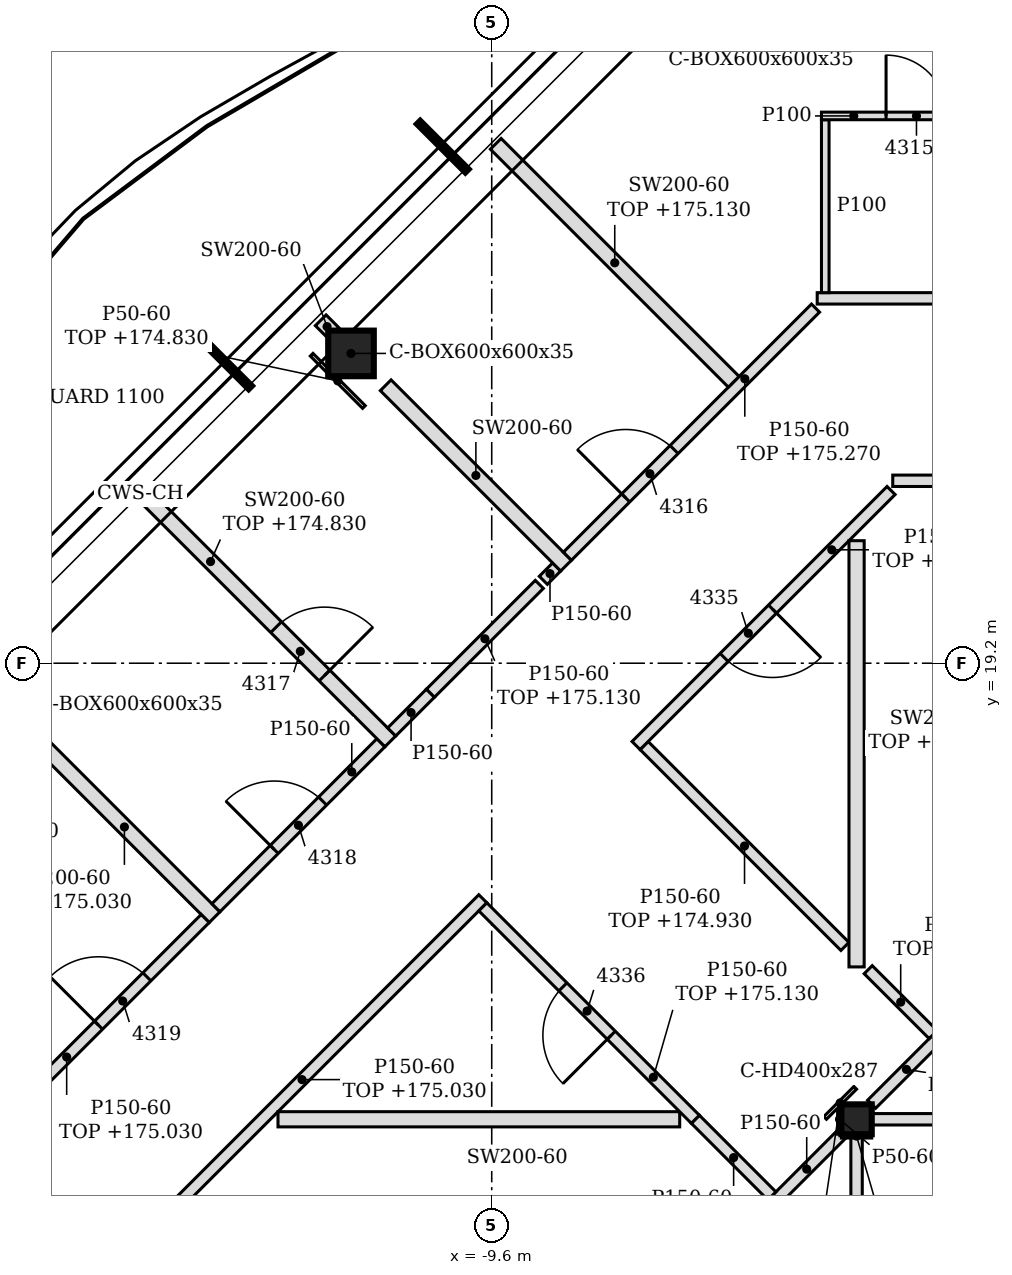
"""IFC4 building model, lengths in metres.
Left out: names, types, materials, properties, quantities, classifications, styles, units other than length and angle.
Written with IfcOpenShell. Run it as: python <this file> out.ifc"""

import sys

from ifc_helpers import new_model, si_unit, direction, frame, frame_2d, origin, origin_2d, place, context, subcontext, project, spatial, polyline, rectangle, hollow_rectangle, i_section, outline, extrude, clip, halfspace, element, fill, save


model = new_model("IFC4")
c1 = context("Model", 3, precision=1e-05, world=origin(), true_north=direction((0.0, 1.0)))
c2 = subcontext(c1, "Body", "Model", "MODEL_VIEW")
j1 = project(units=[si_unit("LENGTHUNIT", "METRE"), si_unit("PLANEANGLEUNIT", "RADIAN")], contexts=[c1])
p1 = place(None, origin())
s1 = spatial("IfcSite", under=j1, at=p1, CompositionType="ELEMENT")
p2 = place(p1, origin())
s2 = spatial("IfcBuilding", under=s1, at=p2, CompositionType="ELEMENT")
p3 = place(p2, frame((0.0, 0.0, 172.2)))
s3 = spatial("IfcBuildingStorey", under=s2, at=p3, CompositionType="ELEMENT", Elevation=172.2)
p4 = place(p3, frame((-11.451, 23.276, -0.15), z_axis=(0.062286590776, -0.041524393851, 0.99719411617), x_axis=(0.554700196225, 0.832050294338, 0.0)))
e1 = element("IfcColumn", 1, at=p4, inside=s3, PredefinedType="COLUMN", context=c2, shape_type="Clipping", body=[
    clip(clip(extrude(hollow_rectangle(XDim=0.6, YDim=0.6, WallThickness=0.035, at=origin_2d()), origin(), (0.0, 0.0, 1.0), 3.61), halfspace(frame((0.0, 0.0, 0.011), z_axis=(0.0, 0.0, 1.0), x_axis=(1.0, 0.0, 0.0)), True)), halfspace(frame((0.0, 0.0, 3.588), z_axis=(0.0, 0.0, 1.0), x_axis=(1.0, 0.0, 0.0)), False)),
])
p5 = place(p3, frame((-4.8, 13.2, -0.15), z_axis=(0.0, 0.0, 1.0), x_axis=(1.0, 0.0, 0.0)))
e2 = element("IfcColumn", 2, at=p5, inside=s3, PredefinedType="COLUMN", context=c2, shape_type="SweptSolid", body=[
    extrude(i_section(OverallWidth=0.399, OverallDepth=0.393, WebThickness=0.023, FlangeThickness=0.037, FilletRadius=0.015, at=origin_2d()), origin(), (0.0, 0.0, 1.0), 3.6),
])
p6 = place(p3, frame((-4.8, 2.596, 0.0), z_axis=(0.0, 0.0, 1.0), x_axis=(0.0, 1.0, 0.0)))
e3 = element("IfcWall", 3, at=p6, inside=s3, PredefinedType="PARTITIONING", context=c2, shape_type="SweptSolid", body=[
    extrude(rectangle(XDim=10.407, YDim=0.15, at=frame_2d((5.204, 0.0))), origin(), (0.0, 0.0, 1.0), 2.83),
])
p7 = place(p6, frame((4.303, 0.0, 0.0)))
e4 = element("IfcOpeningElement", 4, at=p7, cuts=e3, PredefinedType="OPENING", context=c2, shape_type="SweptSolid", body=[
    extrude(rectangle(XDim=0.9, YDim=2.1, at=frame_2d((0.45, 1.05))), frame((0.0, 0.085, 0.0), z_axis=(0.0, -1.0, 0.0), x_axis=(1.0, 0.0, 0.0)), (0.0, 0.0, 1.0), 0.17),
])
p8 = place(p3, frame((-14.475, 11.343, 0.0), z_axis=(0.0, 0.0, 1.0), x_axis=(0.707124921665, 0.707088640243, 0.0)))
e5 = element("IfcWall", 5, at=p8, inside=s3, PredefinedType="PARTITIONING", context=c2, shape_type="SweptSolid", body=[
    extrude(rectangle(XDim=6.729, YDim=0.15, at=frame_2d((3.365, 0.0))), origin(), (0.0, 0.0, 1.0), 2.83),
])
p9 = place(p3, frame((-5.914, 12.086, 0.0), z_axis=(0.0, 0.0, 1.0), x_axis=(0.707106781187, 0.707106781187, 0.0)))
e6 = element("IfcWall", 6, at=p9, inside=s3, PredefinedType="PARTITIONING", context=c2, shape_type="SweptSolid", body=[
    extrude(rectangle(XDim=1.295, YDim=0.15, at=frame_2d((0.648, 0.0))), origin(), (0.0, 0.0, 1.0), 3.45),
])
p10 = place(p3, frame((-5.914, 12.192, 0.0), z_axis=(0.0, 0.0, 1.0), x_axis=(-0.706763941595, 0.707449454633, 0.0)))
e7 = element("IfcWall", 7, at=p10, inside=s3, PredefinedType="PARTITIONING", context=c2, shape_type="SweptSolid", body=[
    extrude(rectangle(XDim=1.425, YDim=0.15, at=frame_2d((0.712, 0.0))), origin(), (0.0, 0.0, 1.0), 3.45),
])
p11 = place(p3, frame((-12.412, 13.2, 0.0), z_axis=(0.0, 0.0, 1.0), x_axis=(1.0, 0.0, 0.0)))
e8 = element("IfcWall", 8, at=p11, inside=s3, PredefinedType="PARTITIONING", context=c2, shape_type="SweptSolid", body=[
    extrude(rectangle(XDim=5.285, YDim=0.2, at=frame_2d((2.643, 0.0))), origin(), (0.0, 0.0, 1.0), 3.45),
])
p12 = place(p3, frame((-6.921, 13.2, 0.0), z_axis=(0.0, 0.0, 1.0), x_axis=(-0.707230271715, 0.706983269088, 0.0)))
e9 = element("IfcWall", 9, at=p12, inside=s3, PredefinedType="PARTITIONING", context=c2, shape_type="SweptSolid", body=[
    extrude(rectangle(XDim=3.954, YDim=0.15, at=frame_2d((1.977, 0.0))), origin(), (0.0, 0.0, 1.0), 2.93),
])
p13 = place(p12, frame((1.564, 0.0, 0.0)))
e10 = element("IfcOpeningElement", 10, at=p13, cuts=e9, PredefinedType="OPENING", context=c2, shape_type="SweptSolid", body=[
    extrude(rectangle(XDim=0.9, YDim=2.1, at=frame_2d((0.45, 1.05))), frame((0.0, 0.085, 0.0), z_axis=(0.0, -1.0, 0.0), x_axis=(1.0, 0.0, 0.0)), (0.0, 0.0, 1.0), 0.17),
])
p14 = place(p3, frame((-4.601, 13.2, 0.0), z_axis=(0.0, 0.0, 1.0), x_axis=(1.0, 0.0, 0.0)))
e11 = element("IfcWall", 11, at=p14, inside=s3, PredefinedType="PARTITIONING", context=c2, shape_type="SweptSolid", body=[
    extrude(rectangle(XDim=9.476, YDim=0.15, at=frame_2d((4.738, 0.0))), origin(), (0.0, 0.0, 1.0), 2.83),
])
p15 = place(p14, frame((4.151, 0.0, 0.0)))
e12 = element("IfcOpeningElement", 12, at=p15, cuts=e11, PredefinedType="OPENING", context=c2, shape_type="SweptSolid", body=[
    extrude(rectangle(XDim=0.9, YDim=2.1, at=frame_2d((0.45, 1.05))), frame((0.0, 0.085, 0.0), z_axis=(0.0, -1.0, 0.0), x_axis=(1.0, 0.0, 0.0)), (0.0, 0.0, 1.0), 0.17),
])
p16 = place(p3, frame((-4.602, 13.398, 0.0), z_axis=(0.0, 0.0, 1.0), x_axis=(0.707106781187, 0.707106781187, 0.0)))
e13 = element("IfcWall", 13, at=p16, inside=s3, PredefinedType="PARTITIONING", context=c2, shape_type="SweptSolid", body=[
    extrude(rectangle(XDim=1.296, YDim=0.15, at=frame_2d((0.648, 0.0))), origin(), (0.0, 0.0, 1.0), 3.45),
])
p17 = place(p3, frame((-15.611, 13.6, 0.0), z_axis=(0.0, 0.0, 1.0), x_axis=(0.707145291481, 0.707068268794, 0.0)))
e14 = element("IfcWall", 14, at=p17, inside=s3, PredefinedType="PARTITIONING", context=c2, shape_type="SweptSolid", body=[
    extrude(rectangle(XDim=3.17, YDim=0.15, at=frame_2d((1.585, 0.0))), origin(), (0.0, 0.0, 1.0), 2.83),
])
p18 = place(p17, frame((1.185, 0.0, 0.0)))
e15 = element("IfcOpeningElement", 15, at=p18, cuts=e14, PredefinedType="OPENING", context=c2, shape_type="SweptSolid", body=[
    extrude(rectangle(XDim=0.9, YDim=2.1, at=frame_2d((0.45, 1.05))), frame((0.0, 0.085, 0.0), z_axis=(0.0, -1.0, 0.0), x_axis=(1.0, 0.0, 0.0)), (0.0, 0.0, 1.0), 0.17),
])
p19 = place(p3, frame((-3.792, 14.314, 0.0), z_axis=(0.0, 0.0, 1.0), x_axis=(-0.707409718716, 0.706803713817, 0.0)))
e16 = element("IfcWall", 16, at=p19, inside=s3, PredefinedType="PARTITIONING", context=c2, shape_type="SweptSolid", body=[
    extrude(rectangle(XDim=1.208, YDim=0.15, at=frame_2d((0.604, 0.0))), origin(), (0.0, 0.0, 1.0), 2.73),
])
p20 = place(p3, frame((-4.8, 15.205, 0.0), z_axis=(0.0, 0.0, 1.0), x_axis=(0.0, 1.0, 0.0)))
e17 = element("IfcWall", 17, at=p20, inside=s3, PredefinedType="PARTITIONING", context=c2, shape_type="SweptSolid", body=[
    extrude(rectangle(XDim=5.607, YDim=0.2, at=frame_2d((2.804, 0.0))), origin(), (0.0, 0.0, 1.0), 2.73),
])
p21 = place(p3, frame((-4.953, 15.474, 0.0), z_axis=(0.0, 0.0, 1.0), x_axis=(-0.707008778354, 0.707204770438, 0.0)))
e18 = element("IfcWall", 18, at=p21, inside=s3, PredefinedType="PARTITIONING", context=c2, shape_type="SweptSolid", body=[
    extrude(rectangle(XDim=3.737, YDim=0.15, at=frame_2d((1.869, 0.0))), origin(), (0.0, 0.0, 1.0), 2.73),
])
p22 = place(p3, frame((-13.246, 15.859, 0.0), z_axis=(0.0, 0.0, 1.0), x_axis=(-0.706961285969, 0.707252246473, 0.0)))
e19 = element("IfcWall", 19, at=p22, inside=s3, PredefinedType="PARTITIONING", context=c2, shape_type="SweptSolid", body=[
    extrude(rectangle(XDim=3.356, YDim=0.2, at=frame_2d((1.678, 0.0))), origin(), (0.0, 0.0, 1.0), 2.83),
])
p23 = place(p3, frame((-13.228, 15.983, 0.0), z_axis=(0.0, 0.0, 1.0), x_axis=(0.706947737832, 0.707265788777, 0.0)))
e20 = element("IfcWall", 20, at=p23, inside=s3, PredefinedType="PARTITIONING", context=c2, shape_type="SweptSolid", body=[
    extrude(rectangle(XDim=3.071, YDim=0.15, at=frame_2d((1.535, 0.0))), origin(), (0.0, 0.0, 1.0), 3.45),
])
p24 = place(p23, frame((1.085, 0.0, 0.0)))
e21 = element("IfcOpeningElement", 21, at=p24, cuts=e20, PredefinedType="OPENING", context=c2, shape_type="SweptSolid", body=[
    extrude(rectangle(XDim=0.9, YDim=2.1, at=frame_2d((0.45, 1.05))), frame((0.0, 0.085, 0.0), z_axis=(0.0, -1.0, 0.0), x_axis=(1.0, 0.0, 0.0)), (0.0, 0.0, 1.0), 0.17),
])
p25 = place(p3, frame((-7.701, 18.117, 0.0), z_axis=(0.0, 0.0, 1.0), x_axis=(0.707106781187, 0.707106781187, 0.0)))
e22 = element("IfcWall", 22, at=p25, inside=s3, PredefinedType="PARTITIONING", context=c2, shape_type="SweptSolid", body=[
    extrude(rectangle(XDim=4.745, YDim=0.15, at=frame_2d((2.372, 0.0))), origin(), (0.0, 0.0, 1.0), 2.73),
])
p26 = place(p25, frame((1.639, 0.0, 0.0)))
e23 = element("IfcOpeningElement", 23, at=p26, cuts=e22, PredefinedType="OPENING", context=c2, shape_type="SweptSolid", body=[
    extrude(rectangle(XDim=0.9, YDim=2.1, at=frame_2d((0.45, 1.05))), frame((0.0, 0.085, 0.0), z_axis=(0.0, -1.0, 0.0), x_axis=(1.0, 0.0, 0.0)), (0.0, 0.0, 1.0), 0.17),
])
p27 = place(p3, frame((-10.934, 18.172, 0.0), z_axis=(0.0, 0.0, 1.0), x_axis=(-0.707106781187, 0.707106781187, 0.0)))
e24 = element("IfcWall", 24, at=p27, inside=s3, PredefinedType="PARTITIONING", context=c2, shape_type="SweptSolid", body=[
    extrude(rectangle(XDim=4.565, YDim=0.2, at=frame_2d((2.282, 0.0))), origin(), (0.0, 0.0, 1.0), 2.63),
])
p28 = place(p27, frame((1.225, 0.0, 0.0)))
e25 = element("IfcOpeningElement", 25, at=p28, cuts=e24, PredefinedType="OPENING", context=c2, shape_type="SweptSolid", body=[
    extrude(rectangle(XDim=0.9, YDim=2.1, at=frame_2d((0.45, 1.05))), frame((0.0, 0.11, 0.0), z_axis=(0.0, -1.0, 0.0), x_axis=(1.0, 0.0, 0.0)), (0.0, 0.0, 1.0), 0.22),
])
p29 = place(p3, frame((-10.916, 18.296, 0.0), z_axis=(0.0, 0.0, 1.0), x_axis=(0.707106781187, 0.707106781187, 0.0)))
e26 = element("IfcWall", 26, at=p29, inside=s3, PredefinedType="PARTITIONING", context=c2, shape_type="SweptSolid", body=[
    extrude(rectangle(XDim=0.722, YDim=0.15, at=frame_2d((0.361, 0.0))), origin(), (0.0, 0.0, 1.0), 3.45),
])
p30 = place(p3, frame((-10.406, 18.806, 0.0), z_axis=(0.0, 0.0, 1.0), x_axis=(0.707408152147, 0.706805281726, 0.0)))
e27 = element("IfcWall", 27, at=p30, inside=s3, PredefinedType="PARTITIONING", context=c2, shape_type="SweptSolid", body=[
    extrude(rectangle(XDim=2.025, YDim=0.15, at=frame_2d((1.012, 0.0))), origin(), (0.0, 0.0, 1.0), 2.93),
])
p31 = place(p3, frame((-8.921, 20.291, 0.0), z_axis=(0.0, 0.0, 1.0), x_axis=(0.706615222949, 0.707597997946, 0.0)))
e28 = element("IfcWall", 28, at=p31, inside=s3, PredefinedType="PARTITIONING", context=c2, shape_type="SweptSolid", body=[
    extrude(rectangle(XDim=0.249, YDim=0.15, at=frame_2d((0.124, 0.0))), origin(), (0.0, 0.0, 1.0), 3.45),
])
p32 = place(p3, frame((-8.622, 20.484, 0.0), z_axis=(0.0, 0.0, 1.0), x_axis=(-0.707070404574, 0.707143155928, 0.0)))
e29 = element("IfcWall", 29, at=p32, inside=s3, PredefinedType="PARTITIONING", context=c2, shape_type="SweptSolid", body=[
    extrude(rectangle(XDim=3.356, YDim=0.2, at=frame_2d((1.678, 0.0))), origin(), (0.0, 0.0, 1.0), 3.45),
])
p33 = place(p3, frame((-8.604, 20.608, 0.0), z_axis=(0.0, 0.0, 1.0), x_axis=(0.707080337897, 0.707133223487, 0.0)))
e30 = element("IfcWall", 30, at=p33, inside=s3, PredefinedType="PARTITIONING", context=c2, shape_type="SweptSolid", body=[
    extrude(rectangle(XDim=4.616, YDim=0.15, at=frame_2d((2.308, 0.0))), origin(), (0.0, 0.0, 1.0), 3.07),
])
p34 = place(p33, frame((1.085, 0.0, 0.0)))
e31 = element("IfcOpeningElement", 31, at=p34, cuts=e30, PredefinedType="OPENING", context=c2, shape_type="SweptSolid", body=[
    extrude(rectangle(XDim=0.9, YDim=2.1, at=frame_2d((0.45, 1.05))), frame((0.0, 0.085, 0.0), z_axis=(0.0, -1.0, 0.0), x_axis=(1.0, 0.0, 0.0)), (0.0, 0.0, 1.0), 0.17),
])
p35 = place(p3, frame((-4.324, 21.6, 0.0), z_axis=(0.0, 0.0, 1.0), x_axis=(1.0, 0.0, 0.0)))
e32 = element("IfcWall", 32, at=p35, inside=s3, PredefinedType="PARTITIONING", context=c2, shape_type="SweptSolid", body=[
    extrude(rectangle(XDim=9.199, YDim=0.15, at=frame_2d((4.6, 0.0))), origin(), (0.0, 0.0, 1.0), 3.45),
])
p36 = place(p3, frame((-6.416, 22.902, 0.0), z_axis=(0.0, 0.0, 1.0), x_axis=(-0.70713434924, 0.707079212059, 0.0)))
e33 = element("IfcWall", 33, at=p36, inside=s3, PredefinedType="PARTITIONING", context=c2, shape_type="SweptSolid", body=[
    extrude(rectangle(XDim=4.428, YDim=0.2, at=frame_2d((2.214, 0.0))), origin(), (0.0, 0.0, 1.0), 2.93),
])
p37 = place(p3, frame((-11.683, 23.545, 0.0), z_axis=(0.0, 0.0, 1.0), x_axis=(-0.707106781187, 0.707106781187, 0.0)))
e34 = element("IfcWall", 34, at=p37, inside=s3, PredefinedType="PARTITIONING", context=c2, shape_type="SweptSolid", body=[
    extrude(rectangle(XDim=0.236, YDim=0.2, at=frame_2d((0.118, 0.0))), origin(), (0.0, 0.0, 1.0), 3.45),
])
p38 = place(p3, frame((-5.318, 24.0, 0.0), z_axis=(0.0, 0.0, 1.0), x_axis=(1.0, 0.0, 0.0)))
e35 = element("IfcWall", 35, at=p38, inside=s3, PredefinedType="PARTITIONING", context=c2, shape_type="SweptSolid", body=[
    extrude(outline(polyline([(0.0, 0.0), (25.036, 0.0), (25.036, 3.45), (24.668, 3.45), (24.666, 2.73), (24.368, 2.73), (24.366, 2.88), (12.668, 2.88), (12.666, 2.73), (12.368, 2.73), (12.366, 2.88), (0.668, 2.88), (0.666, 2.73), (0.368, 2.73), (0.366, 3.45), (0.0, 3.45), (0.0, 0.0)])), frame((0.0, 0.075, 0.0), z_axis=(0.0, -1.0, 0.0), x_axis=(1.0, 0.0, 0.0)), (0.0, 0.0, 1.0), 0.15),
])
p39 = place(p38, frame((21.868, 0.0, 0.0)))
e36 = element("IfcOpeningElement", 36, at=p39, cuts=e35, PredefinedType="OPENING", context=c2, shape_type="SweptSolid", body=[
    extrude(rectangle(XDim=0.9, YDim=2.1, at=frame_2d((0.45, 1.05))), frame((0.0, 0.085, 0.0), z_axis=(0.0, -1.0, 0.0), x_axis=(1.0, 0.0, 0.0)), (0.0, 0.0, 1.0), 0.17),
])
p40 = place(p38, frame((12.181, 0.0, 0.0)))
e37 = element("IfcOpeningElement", 37, at=p40, cuts=e35, PredefinedType="OPENING", context=c2, shape_type="SweptSolid", body=[
    extrude(rectangle(XDim=0.9, YDim=2.1, at=frame_2d((0.45, 1.05))), frame((0.0, 0.085, 0.0), z_axis=(0.0, -1.0, 0.0), x_axis=(1.0, 0.0, 0.0)), (0.0, 0.0, 1.0), 0.17),
])
p41 = place(p38, frame((4.78, 0.0, 0.0)))
e38 = element("IfcOpeningElement", 38, at=p41, cuts=e35, PredefinedType="OPENING", context=c2, shape_type="SweptSolid", body=[
    extrude(rectangle(XDim=0.9, YDim=2.1, at=frame_2d((0.45, 1.05))), frame((0.0, 0.085, 0.0), z_axis=(0.0, -1.0, 0.0), x_axis=(1.0, 0.0, 0.0)), (0.0, 0.0, 1.0), 0.17),
])
p42 = place(p3, frame((-5.212, 24.075, 0.0), z_axis=(0.0, 0.0, 1.0), x_axis=(0.0, 1.0, 0.0)))
e39 = element("IfcWall", 39, at=p42, inside=s3, PredefinedType="PARTITIONING", context=c2, shape_type="SweptSolid", body=[
    extrude(rectangle(XDim=2.275, YDim=0.1, at=frame_2d((1.138, 0.0))), origin(), (0.0, 0.0, 1.0), 3.45),
])
p43 = place(p3, frame((-5.262, 26.4, 0.0), z_axis=(0.0, 0.0, 1.0), x_axis=(1.0, 0.0, 0.0)))
e40 = element("IfcWall", 40, at=p43, inside=s3, PredefinedType="PARTITIONING", context=c2, shape_type="SweptSolid", body=[
    extrude(outline(polyline([(0.0, 0.0), (2.5, 0.0), (2.5, 3.45), (0.612, 3.45), (0.61, 2.73), (0.312, 2.73), (0.31, 3.45), (0.0, 3.45), (0.0, 0.0)])), frame((0.0, 0.05, 0.0), z_axis=(0.0, -1.0, 0.0), x_axis=(1.0, 0.0, 0.0)), (0.0, 0.0, 1.0), 0.1),
])
p44 = place(p43, frame((0.85, 0.0, 0.0)))
e41 = element("IfcOpeningElement", 41, at=p44, cuts=e40, PredefinedType="OPENING", context=c2, shape_type="SweptSolid", body=[
    extrude(rectangle(XDim=0.8, YDim=2.1, at=frame_2d((0.4, 1.05))), frame((0.0, 0.06, 0.0), z_axis=(0.0, -1.0, 0.0), x_axis=(1.0, 0.0, 0.0)), (0.0, 0.0, 1.0), 0.12),
])
p45 = place(p3, frame((-5.024, 13.003, 0.0), z_axis=(0.0, 0.0, 1.0), x_axis=(0.0, 1.0, 0.0)))
e42 = element("IfcWall", 42, at=p45, inside=s3, PredefinedType="PARTITIONING", context=c2, shape_type="SweptSolid", body=[
    extrude(rectangle(XDim=0.393, YDim=0.05, at=frame_2d((0.197, 0.0))), origin(), (0.0, 0.0, 1.0), 3.45),
])
p46 = place(p3, frame((-5.214, 13.218, 0.0), z_axis=(0.0, 0.0, 1.0), x_axis=(0.707106781187, 0.707106781187, 0.0)))
e43 = element("IfcWall", 43, at=p46, inside=s3, PredefinedType="PARTITIONING", context=c2, shape_type="SweptSolid", body=[
    extrude(rectangle(XDim=0.56, YDim=0.05, at=frame_2d((0.28, 0.0))), origin(), (0.0, 0.0, 1.0), 2.73),
])
p47 = place(p3, frame((-5.0, 12.979, 0.0), z_axis=(0.0, 0.0, 1.0), x_axis=(1.0, 0.0, 0.0)))
e44 = element("IfcWall", 44, at=p47, inside=s3, PredefinedType="PARTITIONING", context=c2, shape_type="SweptSolid", body=[
    extrude(rectangle(XDim=0.399, YDim=0.05, at=frame_2d((0.199, 0.0))), origin(), (0.0, 0.0, 1.0), 2.83),
])
p48 = place(p3, frame((-11.281, 22.571, 0.0), z_axis=(0.0, 0.0, 1.0), x_axis=(-0.706981285266, 0.707232254838, 0.0)))
e45 = element("IfcWall", 45, at=p48, inside=s3, PredefinedType="PARTITIONING", context=c2, shape_type="SweptSolid", body=[
    extrude(rectangle(XDim=0.973, YDim=0.05, at=frame_2d((0.486, 0.0))), origin(), (0.0, 0.0, 1.0), 2.63),
])
p49 = place(p44, origin())
e46 = element("IfcDoor", 46, at=p49, inside=s3, OperationType="SINGLE_SWING_LEFT", PredefinedType="DOOR", context=c2, shape_type="SweptSolid", body=[
    extrude(rectangle(XDim=0.8, YDim=2.1, at=frame_2d((0.4, 1.05))), frame((0.0, 0.025, 0.0), z_axis=(0.0, -1.0, 0.0), x_axis=(1.0, 0.0, 0.0)), (0.0, 0.0, 1.0), 0.05),
])
fill(e41, e46)
p50 = place(p34, origin())
e47 = element("IfcDoor", 47, at=p50, inside=s3, OperationType="SINGLE_SWING_LEFT", PredefinedType="DOOR", context=c2, shape_type="SweptSolid", body=[
    extrude(rectangle(XDim=0.9, YDim=2.1, at=frame_2d((0.45, 1.05))), frame((0.0, 0.025, 0.0), z_axis=(0.0, -1.0, 0.0), x_axis=(1.0, 0.0, 0.0)), (0.0, 0.0, 1.0), 0.05),
])
fill(e31, e47)
p51 = place(p28, frame((0.9, 0.0, 0.0), z_axis=(0.0, 0.0, 1.0), x_axis=(-1.0, 0.0, 0.0)))
e48 = element("IfcDoor", 48, at=p51, inside=s3, OperationType="SINGLE_SWING_RIGHT", PredefinedType="DOOR", context=c2, shape_type="SweptSolid", body=[
    extrude(rectangle(XDim=0.9, YDim=2.1, at=frame_2d((0.45, 1.05))), frame((0.0, 0.025, 0.0), z_axis=(0.0, -1.0, 0.0), x_axis=(1.0, 0.0, 0.0)), (0.0, 0.0, 1.0), 0.05),
])
fill(e25, e48)
p52 = place(p24, origin())
e49 = element("IfcDoor", 49, at=p52, inside=s3, OperationType="SINGLE_SWING_LEFT", PredefinedType="DOOR", context=c2, shape_type="SweptSolid", body=[
    extrude(rectangle(XDim=0.9, YDim=2.1, at=frame_2d((0.45, 1.05))), frame((0.0, 0.025, 0.0), z_axis=(0.0, -1.0, 0.0), x_axis=(1.0, 0.0, 0.0)), (0.0, 0.0, 1.0), 0.05),
])
fill(e21, e49)
p53 = place(p18, origin())
e50 = element("IfcDoor", 50, at=p53, inside=s3, OperationType="SINGLE_SWING_LEFT", PredefinedType="DOOR", context=c2, shape_type="SweptSolid", body=[
    extrude(rectangle(XDim=0.9, YDim=2.1, at=frame_2d((0.45, 1.05))), frame((0.0, 0.025, 0.0), z_axis=(0.0, -1.0, 0.0), x_axis=(1.0, 0.0, 0.0)), (0.0, 0.0, 1.0), 0.05),
])
fill(e15, e50)
p54 = place(p26, frame((0.9, 0.0, 0.0), z_axis=(0.0, 0.0, 1.0), x_axis=(-1.0, 0.0, 0.0)))
e51 = element("IfcDoor", 51, at=p54, inside=s3, OperationType="SINGLE_SWING_LEFT", PredefinedType="DOOR", context=c2, shape_type="SweptSolid", body=[
    extrude(rectangle(XDim=0.9, YDim=2.1, at=frame_2d((0.45, 1.05))), frame((0.0, 0.025, 0.0), z_axis=(0.0, -1.0, 0.0), x_axis=(1.0, 0.0, 0.0)), (0.0, 0.0, 1.0), 0.05),
])
fill(e23, e51)
p55 = place(p13, origin())
e52 = element("IfcDoor", 52, at=p55, inside=s3, OperationType="SINGLE_SWING_LEFT", PredefinedType="DOOR", context=c2, shape_type="SweptSolid", body=[
    extrude(rectangle(XDim=0.9, YDim=2.1, at=frame_2d((0.45, 1.05))), frame((0.0, 0.025, 0.0), z_axis=(0.0, -1.0, 0.0), x_axis=(1.0, 0.0, 0.0)), (0.0, 0.0, 1.0), 0.05),
])
fill(e10, e52)
save(model, sys.argv[1])
